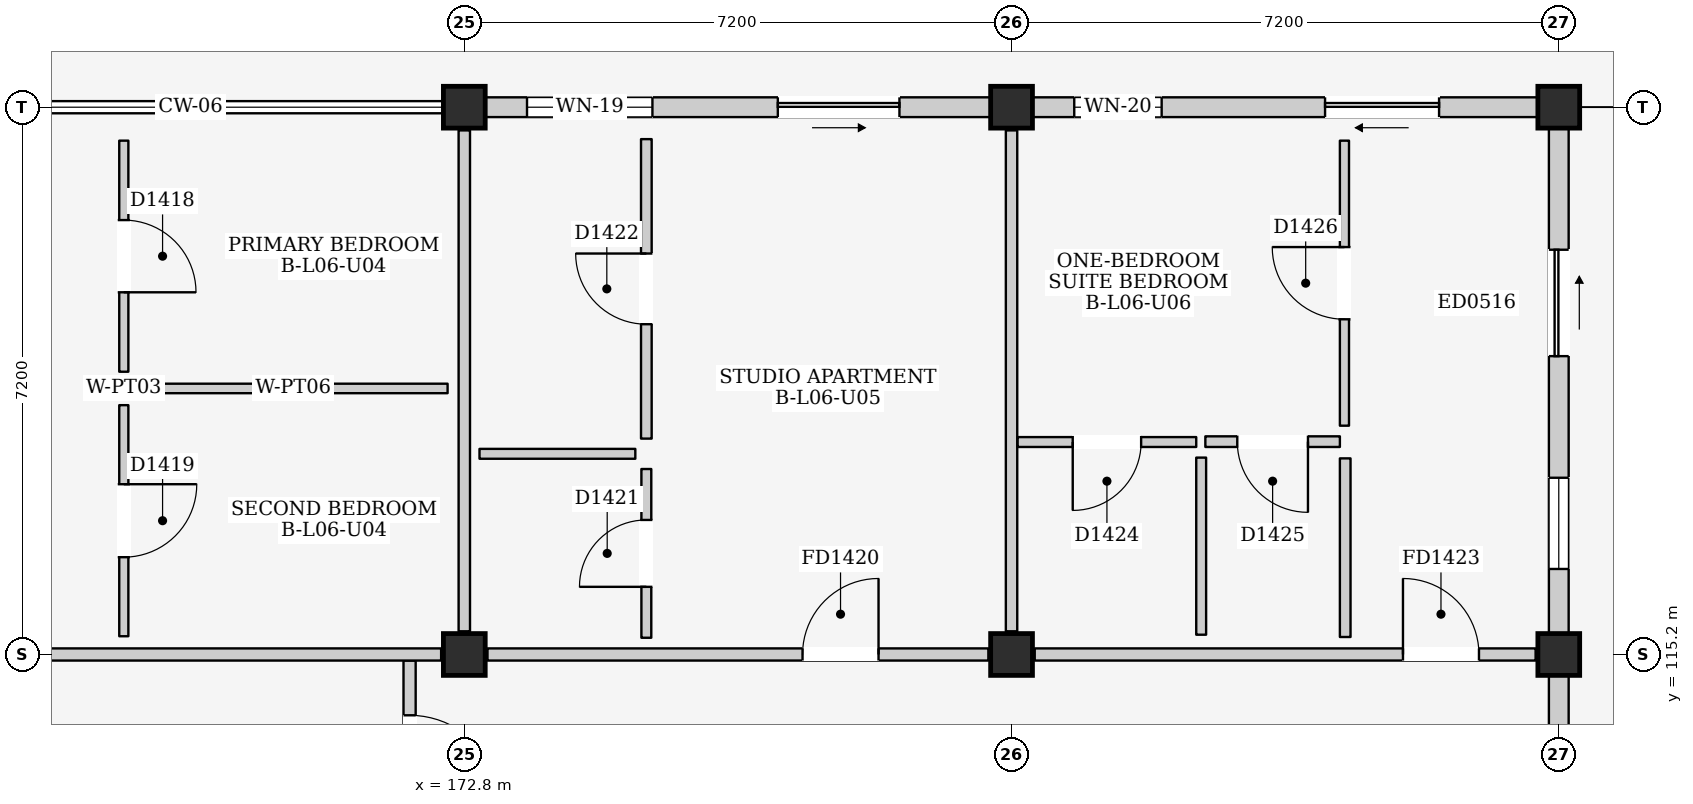
"""IFC4 building model, lengths in metres.
Left out: names, types, materials, properties, quantities, classifications, styles, units other than length and angle.
Written with IfcOpenShell. Run it as: python <this file> out.ifc"""

import sys

from ifc_helpers import new_model, si_unit, direction, frame, frame_2d, origin, origin_2d, place, context, subcontext, project, spatial, rectangle, extrude, element, fill, save


model = new_model("IFC4")
c1 = context("Model", 3, precision=1e-05, world=origin(), true_north=direction((0.0, 1.0)))
c2 = subcontext(c1, "Body", "Model", "MODEL_VIEW")
j1 = project(units=[si_unit("LENGTHUNIT", "METRE"), si_unit("PLANEANGLEUNIT", "RADIAN")], contexts=[c1])
p1 = place(None, origin())
s1 = spatial("IfcSite", under=j1, at=p1, CompositionType="ELEMENT")
p2 = place(p1, origin())
s2 = spatial("IfcBuilding", under=s1, at=p2, CompositionType="ELEMENT")
p3 = place(p2, frame((0.0, 0.0, 21.9)))
s3 = spatial("IfcBuildingStorey", under=s2, at=p3, CompositionType="ELEMENT", Elevation=21.9)
for number, where, z_axis, x_axis in (
    (1, (172.8, 115.2, 0.0), (0.0, 0.0, 1.0), (1.0, 0.0, 0.0)),
    (2, (172.8, 122.4, 0.0), (0.0, 0.0, 1.0), (1.0, 0.0, 0.0)),
    (3, (180.0, 115.2, 0.0), (0.0, 0.0, 1.0), (1.0, 0.0, 0.0)),
    (4, (180.0, 122.4, 0.0), (0.0, 0.0, 1.0), (1.0, 0.0, 0.0)),
    (5, (187.2, 115.2, 0.0), (0.0, 0.0, 1.0), (1.0, 0.0, 0.0)),
    (6, (187.2, 122.4, 0.0), (0.0, 0.0, 1.0), (1.0, 0.0, 0.0)),
):
    element("IfcColumn", number, at=place(p3, frame(where, z_axis=z_axis, x_axis=x_axis)), inside=s3, PredefinedType="COLUMN", context=c2, shape_type="SweptSolid", body=[
        extrude(rectangle(XDim=0.55, YDim=0.55, at=origin_2d()), origin(), (0.0, 0.0, 1.0), 3.2),
    ])
p4 = place(p3, frame((173.075, 122.4, 0.0), z_axis=(0.0, 0.0, 1.0), x_axis=(1.0, 0.0, 0.0)))
e7 = element("IfcWall", 7, at=p4, inside=s3, PredefinedType="ELEMENTEDWALL", context=c2, shape_type="SweptSolid", body=[
    extrude(rectangle(XDim=6.65, YDim=0.26, at=frame_2d((3.325, 0.0))), origin(), (0.0, 0.0, 1.0), 2.515),
])
p5 = place(p4, frame((3.85, 0.0, 0.0)))
e8 = element("IfcOpeningElement", 8, at=p5, cuts=e7, PredefinedType="OPENING", context=c2, shape_type="SweptSolid", body=[
    extrude(rectangle(XDim=1.6, YDim=2.12, at=frame_2d((0.8, 1.06))), frame((0.0, 0.145, 0.0), z_axis=(0.0, -1.0, 0.0), x_axis=(1.0, 0.0, 0.0)), (0.0, 0.0, 1.0), 0.29),
])
p6 = place(p4, frame((0.55, 0.0, 0.9)))
e9 = element("IfcOpeningElement", 9, at=p6, cuts=e7, PredefinedType="OPENING", context=c2, shape_type="SweptSolid", body=[
    extrude(rectangle(XDim=1.65, YDim=1.35, at=frame_2d((0.825, 0.675))), frame((0.0, 0.145, 0.0), z_axis=(0.0, -1.0, 0.0), x_axis=(1.0, 0.0, 0.0)), (0.0, 0.0, 1.0), 0.29),
])
p7 = place(p3, frame((187.2, 108.275, 0.0), z_axis=(0.0, 0.0, 1.0), x_axis=(0.0, 1.0, 0.0)))
e10 = element("IfcWall", 10, at=p7, inside=s3, PredefinedType="ELEMENTEDWALL", context=c2, shape_type="SweptSolid", body=[
    extrude(rectangle(XDim=6.65, YDim=0.26, at=frame_2d((3.325, 0.0))), origin(), (0.0, 0.0, 1.0), 2.515),
])
p8 = place(p7, frame((3.65, 0.0, 0.0)))
e11 = element("IfcOpeningElement", 11, at=p8, cuts=e10, PredefinedType="OPENING", context=c2, shape_type="SweptSolid", body=[
    extrude(rectangle(XDim=1.4, YDim=2.1, at=frame_2d((0.7, 1.05))), frame((0.0, 0.145, 0.0), z_axis=(0.0, -1.0, 0.0), x_axis=(1.0, 0.0, 0.0)), (0.0, 0.0, 1.0), 0.29),
])
p9 = place(p3, frame((180.275, 122.4, 0.0), z_axis=(0.0, 0.0, 1.0), x_axis=(1.0, 0.0, 0.0)))
e12 = element("IfcWall", 12, at=p9, inside=s3, PredefinedType="ELEMENTEDWALL", context=c2, shape_type="SweptSolid", body=[
    extrude(rectangle(XDim=6.65, YDim=0.26, at=frame_2d((3.325, 0.0))), origin(), (0.0, 0.0, 1.0), 2.515),
])
p10 = place(p9, frame((3.85, 0.0, 0.0)))
e13 = element("IfcOpeningElement", 13, at=p10, cuts=e12, PredefinedType="OPENING", context=c2, shape_type="SweptSolid", body=[
    extrude(rectangle(XDim=1.5, YDim=2.12, at=frame_2d((0.75, 1.06))), frame((0.0, 0.145, 0.0), z_axis=(0.0, -1.0, 0.0), x_axis=(1.0, 0.0, 0.0)), (0.0, 0.0, 1.0), 0.29),
])
p11 = place(p9, frame((0.55, 0.0, 0.9)))
e14 = element("IfcOpeningElement", 14, at=p11, cuts=e12, PredefinedType="OPENING", context=c2, shape_type="SweptSolid", body=[
    extrude(rectangle(XDim=1.15, YDim=1.15, at=frame_2d((0.575, 0.575))), frame((0.0, 0.145, 0.0), z_axis=(0.0, -1.0, 0.0), x_axis=(1.0, 0.0, 0.0)), (0.0, 0.0, 1.0), 0.29),
])
p12 = place(p3, frame((187.2, 115.475, 0.0), z_axis=(0.0, 0.0, 1.0), x_axis=(0.0, 1.0, 0.0)))
e15 = element("IfcWall", 15, at=p12, inside=s3, PredefinedType="ELEMENTEDWALL", context=c2, shape_type="SweptSolid", body=[
    extrude(rectangle(XDim=6.65, YDim=0.26, at=frame_2d((3.325, 0.0))), origin(), (0.0, 0.0, 1.0), 2.515),
])
p13 = place(p12, frame((3.65, 0.0, 0.0)))
e16 = element("IfcOpeningElement", 16, at=p13, cuts=e15, PredefinedType="OPENING", context=c2, shape_type="SweptSolid", body=[
    extrude(rectangle(XDim=1.4, YDim=2.1, at=frame_2d((0.7, 1.05))), frame((0.0, 0.145, 0.0), z_axis=(0.0, -1.0, 0.0), x_axis=(1.0, 0.0, 0.0)), (0.0, 0.0, 1.0), 0.29),
])
p14 = place(p12, frame((0.85, 0.0, 0.95)))
e17 = element("IfcOpeningElement", 17, at=p14, cuts=e15, PredefinedType="OPENING", context=c2, shape_type="SweptSolid", body=[
    extrude(rectangle(XDim=1.2, YDim=1.35, at=frame_2d((0.6, 0.675))), frame((0.0, 0.145, 0.0), z_axis=(0.0, -1.0, 0.0), x_axis=(1.0, 0.0, 0.0)), (0.0, 0.0, 1.0), 0.29),
])
p15 = place(p3, frame((172.08, 110.8, 0.0), z_axis=(0.0, 0.0, 1.0), x_axis=(0.0, 1.0, 0.0)))
e18 = element("IfcWall", 18, at=p15, inside=s3, PredefinedType="PARTITIONING", context=c2, shape_type="SweptSolid", body=[
    extrude(rectangle(XDim=4.32, YDim=0.16, at=frame_2d((2.16, 0.0))), origin(), (0.0, 0.0, 1.0), 2.98),
])
p16 = place(p15, frame((2.4, 0.0, 0.0)))
e19 = element("IfcOpeningElement", 19, at=p16, cuts=e18, PredefinedType="OPENING", context=c2, shape_type="SweptSolid", body=[
    extrude(rectangle(XDim=1.2, YDim=2.2, at=frame_2d((0.6, 1.1))), frame((0.0, 0.095, 0.0), z_axis=(0.0, -1.0, 0.0), x_axis=(1.0, 0.0, 0.0)), (0.0, 0.0, 1.0), 0.19),
])
p17 = place(p3, frame((165.905, 115.2, 0.0), z_axis=(0.0, 0.0, 1.0), x_axis=(1.0, 0.0, 0.0)))
e20 = element("IfcWall", 20, at=p17, inside=s3, PredefinedType="PARTITIONING", context=c2, shape_type="SweptSolid", body=[
    extrude(rectangle(XDim=6.59, YDim=0.16, at=frame_2d((3.295, 0.0))), origin(), (0.0, 0.0, 1.0), 2.365),
])
p18 = place(p3, frame((172.8, 115.505, 0.0), z_axis=(0.0, 0.0, 1.0), x_axis=(0.0, 1.0, 0.0)))
e21 = element("IfcWall", 21, at=p18, inside=s3, PredefinedType="PARTITIONING", context=c2, shape_type="SweptSolid", body=[
    extrude(rectangle(XDim=6.59, YDim=0.15, at=frame_2d((3.295, 0.0))), origin(), (0.0, 0.0, 1.0), 2.465),
])
p19 = place(p3, frame((168.32, 118.92, 0.0), z_axis=(0.0, 0.0, 1.0), x_axis=(0.0, 1.0, 0.0)))
e22 = element("IfcWall", 22, at=p19, inside=s3, PredefinedType="PARTITIONING", context=c2, shape_type="SweptSolid", body=[
    extrude(rectangle(XDim=3.04, YDim=0.12, at=frame_2d((1.52, 0.0))), origin(), (0.0, 0.0, 1.0), 2.98),
])
p20 = place(p19, frame((1.045, 0.0, 0.0)))
e23 = element("IfcOpeningElement", 23, at=p20, cuts=e22, PredefinedType="OPENING", context=c2, shape_type="SweptSolid", body=[
    extrude(rectangle(XDim=0.95, YDim=2.15, at=frame_2d((0.475, 1.075))), frame((0.0, 0.075, 0.0), z_axis=(0.0, -1.0, 0.0), x_axis=(1.0, 0.0, 0.0)), (0.0, 0.0, 1.0), 0.15),
])
p21 = place(p3, frame((168.52, 118.7, 0.0), z_axis=(0.0, 0.0, 1.0), x_axis=(1.0, 0.0, 0.0)))
e24 = element("IfcWall", 24, at=p21, inside=s3, PredefinedType="PARTITIONING", context=c2, shape_type="SweptSolid", body=[
    extrude(rectangle(XDim=4.06, YDim=0.125, at=frame_2d((2.03, 0.0))), origin(), (0.0, 0.0, 1.0), 2.98),
])
p22 = place(p3, frame((168.32, 115.44, 0.0), z_axis=(0.0, 0.0, 1.0), x_axis=(0.0, 1.0, 0.0)))
e25 = element("IfcWall", 25, at=p22, inside=s3, PredefinedType="PARTITIONING", context=c2, shape_type="SweptSolid", body=[
    extrude(rectangle(XDim=3.04, YDim=0.12, at=frame_2d((1.52, 0.0))), origin(), (0.0, 0.0, 1.0), 2.98),
])
p23 = place(p22, frame((1.04, 0.0, 0.0)))
e26 = element("IfcOpeningElement", 26, at=p23, cuts=e25, PredefinedType="OPENING", context=c2, shape_type="SweptSolid", body=[
    extrude(rectangle(XDim=0.96, YDim=2.15, at=frame_2d((0.48, 1.075))), frame((0.0, 0.075, 0.0), z_axis=(0.0, -1.0, 0.0), x_axis=(1.0, 0.0, 0.0)), (0.0, 0.0, 1.0), 0.15),
])
p24 = place(p3, frame((173.105, 115.2, 0.0), z_axis=(0.0, 0.0, 1.0), x_axis=(1.0, 0.0, 0.0)))
e27 = element("IfcWall", 27, at=p24, inside=s3, PredefinedType="PARTITIONING", context=c2, shape_type="SweptSolid", body=[
    extrude(rectangle(XDim=6.59, YDim=0.16, at=frame_2d((3.295, 0.0))), origin(), (0.0, 0.0, 1.0), 2.365),
])
p25 = place(p24, frame((4.145, 0.0, 0.0)))
e28 = element("IfcOpeningElement", 28, at=p25, cuts=e27, PredefinedType="OPENING", context=c2, shape_type="SweptSolid", body=[
    extrude(rectangle(XDim=1.0, YDim=2.15, at=frame_2d((0.5, 1.075))), frame((0.0, 0.095, 0.0), z_axis=(0.0, -1.0, 0.0), x_axis=(1.0, 0.0, 0.0)), (0.0, 0.0, 1.0), 0.19),
])
p26 = place(p3, frame((180.0, 115.505, 0.0), z_axis=(0.0, 0.0, 1.0), x_axis=(0.0, 1.0, 0.0)))
e29 = element("IfcWall", 29, at=p26, inside=s3, PredefinedType="PARTITIONING", context=c2, shape_type="SweptSolid", body=[
    extrude(rectangle(XDim=6.59, YDim=0.15, at=frame_2d((3.295, 0.0))), origin(), (0.0, 0.0, 1.0), 2.465),
])
p27 = place(p3, frame((173.0, 117.84, 0.0), z_axis=(0.0, 0.0, 1.0), x_axis=(1.0, 0.0, 0.0)))
e30 = element("IfcWall", 30, at=p27, inside=s3, PredefinedType="PARTITIONING", context=c2, shape_type="SweptSolid", body=[
    extrude(rectangle(XDim=2.05, YDim=0.13, at=frame_2d((1.025, 0.0))), origin(), (0.0, 0.0, 1.0), 2.98),
])
p28 = place(p3, frame((175.195, 115.42, 0.0), z_axis=(0.0, 0.0, 1.0), x_axis=(0.0, 1.0, 0.0)))
e31 = element("IfcWall", 31, at=p28, inside=s3, PredefinedType="PARTITIONING", context=c2, shape_type="SweptSolid", body=[
    extrude(rectangle(XDim=2.22, YDim=0.13, at=frame_2d((1.11, 0.0))), origin(), (0.0, 0.0, 1.0), 2.98),
])
p29 = place(p28, frame((0.67, 0.0, 0.0)))
e32 = element("IfcOpeningElement", 32, at=p29, cuts=e31, PredefinedType="OPENING", context=c2, shape_type="SweptSolid", body=[
    extrude(rectangle(XDim=0.88, YDim=2.1, at=frame_2d((0.44, 1.05))), frame((0.0, 0.08, 0.0), z_axis=(0.0, -1.0, 0.0), x_axis=(1.0, 0.0, 0.0)), (0.0, 0.0, 1.0), 0.16),
])
p30 = place(p3, frame((175.195, 118.04, 0.0), z_axis=(0.0, 0.0, 1.0), x_axis=(0.0, 1.0, 0.0)))
e33 = element("IfcWall", 33, at=p30, inside=s3, PredefinedType="PARTITIONING", context=c2, shape_type="SweptSolid", body=[
    extrude(rectangle(XDim=3.94, YDim=0.14, at=frame_2d((1.97, 0.0))), origin(), (0.0, 0.0, 1.0), 2.98),
])
p31 = place(p30, frame((1.505, 0.0, 0.0)))
e34 = element("IfcOpeningElement", 34, at=p31, cuts=e33, PredefinedType="OPENING", context=c2, shape_type="SweptSolid", body=[
    extrude(rectangle(XDim=0.93, YDim=2.14, at=frame_2d((0.465, 1.07))), frame((0.0, 0.085, 0.0), z_axis=(0.0, -1.0, 0.0), x_axis=(1.0, 0.0, 0.0)), (0.0, 0.0, 1.0), 0.17),
])
p32 = place(p3, frame((180.305, 115.2, 0.0), z_axis=(0.0, 0.0, 1.0), x_axis=(1.0, 0.0, 0.0)))
e35 = element("IfcWall", 35, at=p32, inside=s3, PredefinedType="PARTITIONING", context=c2, shape_type="SweptSolid", body=[
    extrude(rectangle(XDim=6.59, YDim=0.16, at=frame_2d((3.295, 0.0))), origin(), (0.0, 0.0, 1.0), 2.365),
])
p33 = place(p32, frame((4.845, 0.0, 0.0)))
e36 = element("IfcOpeningElement", 36, at=p33, cuts=e35, PredefinedType="OPENING", context=c2, shape_type="SweptSolid", body=[
    extrude(rectangle(XDim=1.0, YDim=2.15, at=frame_2d((0.5, 1.075))), frame((0.0, 0.095, 0.0), z_axis=(0.0, -1.0, 0.0), x_axis=(1.0, 0.0, 0.0)), (0.0, 0.0, 1.0), 0.19),
])
p34 = place(p3, frame((180.08, 117.995, 0.0), z_axis=(0.0, 0.0, 1.0), x_axis=(1.0, 0.0, 0.0)))
e37 = element("IfcWall", 37, at=p34, inside=s3, PredefinedType="PARTITIONING", context=c2, shape_type="SweptSolid", body=[
    extrude(rectangle(XDim=2.35, YDim=0.13, at=frame_2d((1.175, 0.0))), origin(), (0.0, 0.0, 1.0), 2.98),
])
p35 = place(p34, frame((0.725, 0.0, 0.0)))
e38 = element("IfcOpeningElement", 38, at=p35, cuts=e37, PredefinedType="OPENING", context=c2, shape_type="SweptSolid", body=[
    extrude(rectangle(XDim=0.9, YDim=2.1, at=frame_2d((0.45, 1.05))), frame((0.0, 0.08, 0.0), z_axis=(0.0, -1.0, 0.0), x_axis=(1.0, 0.0, 0.0)), (0.0, 0.0, 1.0), 0.16),
])
p36 = place(p3, frame((182.495, 115.46, 0.0), z_axis=(0.0, 0.0, 1.0), x_axis=(0.0, 1.0, 0.0)))
e39 = element("IfcWall", 39, at=p36, inside=s3, PredefinedType="PARTITIONING", context=c2, shape_type="SweptSolid", body=[
    extrude(rectangle(XDim=2.33, YDim=0.13, at=frame_2d((1.165, 0.0))), origin(), (0.0, 0.0, 1.0), 2.98),
])
p37 = place(p3, frame((182.55, 118.0, 0.0), z_axis=(0.0, 0.0, 1.0), x_axis=(1.0, 0.0, 0.0)))
e40 = element("IfcWall", 40, at=p37, inside=s3, PredefinedType="PARTITIONING", context=c2, shape_type="SweptSolid", body=[
    extrude(rectangle(XDim=1.77, YDim=0.14, at=frame_2d((0.885, 0.0))), origin(), (0.0, 0.0, 1.0), 2.98),
])
p38 = place(p37, frame((0.42, 0.0, 0.0)))
e41 = element("IfcOpeningElement", 41, at=p38, cuts=e40, PredefinedType="OPENING", context=c2, shape_type="SweptSolid", body=[
    extrude(rectangle(XDim=0.93, YDim=2.14, at=frame_2d((0.465, 1.07))), frame((0.0, 0.085, 0.0), z_axis=(0.0, -1.0, 0.0), x_axis=(1.0, 0.0, 0.0)), (0.0, 0.0, 1.0), 0.17),
])
p39 = place(p3, frame((184.39, 115.43, 0.0), z_axis=(0.0, 0.0, 1.0), x_axis=(0.0, 1.0, 0.0)))
e42 = element("IfcWall", 42, at=p39, inside=s3, PredefinedType="PARTITIONING", context=c2, shape_type="SweptSolid", body=[
    extrude(rectangle(XDim=2.35, YDim=0.14, at=frame_2d((1.175, 0.0))), origin(), (0.0, 0.0, 1.0), 2.98),
])
p40 = place(p3, frame((184.38, 118.21, 0.0), z_axis=(0.0, 0.0, 1.0), x_axis=(0.0, 1.0, 0.0)))
e43 = element("IfcWall", 43, at=p40, inside=s3, PredefinedType="PARTITIONING", context=c2, shape_type="SweptSolid", body=[
    extrude(rectangle(XDim=3.75, YDim=0.12, at=frame_2d((1.875, 0.0))), origin(), (0.0, 0.0, 1.0), 2.98),
])
p41 = place(p40, frame((1.4, 0.0, 0.0)))
e44 = element("IfcOpeningElement", 44, at=p41, cuts=e43, PredefinedType="OPENING", context=c2, shape_type="SweptSolid", body=[
    extrude(rectangle(XDim=0.95, YDim=2.15, at=frame_2d((0.475, 1.075))), frame((0.0, 0.075, 0.0), z_axis=(0.0, -1.0, 0.0), x_axis=(1.0, 0.0, 0.0)), (0.0, 0.0, 1.0), 0.15),
])
p42 = place(p5, frame((1.6, 0.0, 0.0), z_axis=(0.0, 0.0, 1.0), x_axis=(-1.0, 0.0, 0.0)))
e45 = element("IfcDoor", 45, at=p42, inside=s3, OperationType="SLIDING_TO_RIGHT", PredefinedType="DOOR", context=c2, shape_type="SweptSolid", body=[
    extrude(rectangle(XDim=1.6, YDim=2.12, at=frame_2d((0.8, 1.06))), frame((0.0, 0.025, 0.0), z_axis=(0.0, -1.0, 0.0), x_axis=(1.0, 0.0, 0.0)), (0.0, 0.0, 1.0), 0.05),
])
fill(e8, e45)
p43 = place(p6, origin())
e46 = element("IfcWindow", 46, at=p43, inside=s3, PartitioningType="DOUBLE_PANEL_VERTICAL", PredefinedType="WINDOW", context=c2, shape_type="SweptSolid", body=[
    extrude(rectangle(XDim=1.65, YDim=1.35, at=frame_2d((0.825, 0.675))), frame((0.0, 0.03, 0.0), z_axis=(0.0, -1.0, 0.0), x_axis=(1.0, 0.0, 0.0)), (0.0, 0.0, 1.0), 0.06),
])
fill(e9, e46)
p44 = place(p10, frame((1.5, 0.0, 0.0), z_axis=(0.0, 0.0, 1.0), x_axis=(-1.0, 0.0, 0.0)))
e47 = element("IfcDoor", 47, at=p44, inside=s3, OperationType="SLIDING_TO_LEFT", PredefinedType="DOOR", context=c2, shape_type="SweptSolid", body=[
    extrude(rectangle(XDim=1.5, YDim=2.12, at=frame_2d((0.75, 1.06))), frame((0.0, 0.025, 0.0), z_axis=(0.0, -1.0, 0.0), x_axis=(1.0, 0.0, 0.0)), (0.0, 0.0, 1.0), 0.05),
])
fill(e13, e47)
p45 = place(p11, origin())
e48 = element("IfcWindow", 48, at=p45, inside=s3, PartitioningType="SINGLE_PANEL", PredefinedType="WINDOW", context=c2, shape_type="SweptSolid", body=[
    extrude(rectangle(XDim=1.15, YDim=1.15, at=frame_2d((0.575, 0.575))), frame((0.0, 0.03, 0.0), z_axis=(0.0, -1.0, 0.0), x_axis=(1.0, 0.0, 0.0)), (0.0, 0.0, 1.0), 0.06),
])
fill(e14, e48)
p46 = place(p13, frame((1.4, 0.0, 0.0), z_axis=(0.0, 0.0, 1.0), x_axis=(-1.0, 0.0, 0.0)))
e49 = element("IfcDoor", 49, at=p46, inside=s3, OperationType="SLIDING_TO_RIGHT", PredefinedType="DOOR", context=c2, shape_type="SweptSolid", body=[
    extrude(rectangle(XDim=1.4, YDim=2.1, at=frame_2d((0.7, 1.05))), frame((0.0, 0.025, 0.0), z_axis=(0.0, -1.0, 0.0), x_axis=(1.0, 0.0, 0.0)), (0.0, 0.0, 1.0), 0.05),
])
fill(e16, e49)
p47 = place(p14, origin())
e50 = element("IfcWindow", 50, at=p47, inside=s3, PartitioningType="SINGLE_PANEL", PredefinedType="WINDOW", context=c2, shape_type="SweptSolid", body=[
    extrude(rectangle(XDim=1.2, YDim=1.35, at=frame_2d((0.6, 0.675))), frame((0.0, 0.03, 0.0), z_axis=(0.0, -1.0, 0.0), x_axis=(1.0, 0.0, 0.0)), (0.0, 0.0, 1.0), 0.06),
])
fill(e17, e50)
p48 = place(p16, frame((1.2, 0.0, 0.0), z_axis=(0.0, 0.0, 1.0), x_axis=(-1.0, 0.0, 0.0)))
e51 = element("IfcDoor", 51, at=p48, inside=s3, OperationType="SINGLE_SWING_RIGHT", PredefinedType="DOOR", context=c2, shape_type="SweptSolid", body=[
    extrude(rectangle(XDim=1.2, YDim=2.2, at=frame_2d((0.6, 1.1))), frame((0.0, 0.025, 0.0), z_axis=(0.0, -1.0, 0.0), x_axis=(1.0, 0.0, 0.0)), (0.0, 0.0, 1.0), 0.05),
])
fill(e19, e51)
p49 = place(p20, frame((0.95, 0.0, 0.0), z_axis=(0.0, 0.0, 1.0), x_axis=(-1.0, 0.0, 0.0)))
e52 = element("IfcDoor", 52, at=p49, inside=s3, OperationType="SINGLE_SWING_RIGHT", PredefinedType="DOOR", context=c2, shape_type="SweptSolid", body=[
    extrude(rectangle(XDim=0.95, YDim=2.15, at=frame_2d((0.475, 1.075))), frame((0.0, 0.025, 0.0), z_axis=(0.0, -1.0, 0.0), x_axis=(1.0, 0.0, 0.0)), (0.0, 0.0, 1.0), 0.05),
])
fill(e23, e52)
p50 = place(p23, frame((0.96, 0.0, 0.0), z_axis=(0.0, 0.0, 1.0), x_axis=(-1.0, 0.0, 0.0)))
e53 = element("IfcDoor", 53, at=p50, inside=s3, OperationType="SINGLE_SWING_LEFT", PredefinedType="DOOR", context=c2, shape_type="SweptSolid", body=[
    extrude(rectangle(XDim=0.96, YDim=2.15, at=frame_2d((0.48, 1.075))), frame((0.0, 0.025, 0.0), z_axis=(0.0, -1.0, 0.0), x_axis=(1.0, 0.0, 0.0)), (0.0, 0.0, 1.0), 0.05),
])
fill(e26, e53)
p51 = place(p25, origin())
e54 = element("IfcDoor", 54, at=p51, inside=s3, OperationType="SINGLE_SWING_RIGHT", PredefinedType="DOOR", context=c2, shape_type="SweptSolid", body=[
    extrude(rectangle(XDim=1.0, YDim=2.15, at=frame_2d((0.5, 1.075))), frame((0.0, 0.025, 0.0), z_axis=(0.0, -1.0, 0.0), x_axis=(1.0, 0.0, 0.0)), (0.0, 0.0, 1.0), 0.05),
])
fill(e28, e54)
p52 = place(p29, origin())
e55 = element("IfcDoor", 55, at=p52, inside=s3, OperationType="SINGLE_SWING_LEFT", PredefinedType="DOOR", context=c2, shape_type="SweptSolid", body=[
    extrude(rectangle(XDim=0.88, YDim=2.1, at=frame_2d((0.44, 1.05))), frame((0.0, 0.025, 0.0), z_axis=(0.0, -1.0, 0.0), x_axis=(1.0, 0.0, 0.0)), (0.0, 0.0, 1.0), 0.05),
])
fill(e32, e55)
p53 = place(p31, origin())
e56 = element("IfcDoor", 56, at=p53, inside=s3, OperationType="SINGLE_SWING_RIGHT", PredefinedType="DOOR", context=c2, shape_type="SweptSolid", body=[
    extrude(rectangle(XDim=0.93, YDim=2.14, at=frame_2d((0.465, 1.07))), frame((0.0, 0.025, 0.0), z_axis=(0.0, -1.0, 0.0), x_axis=(1.0, 0.0, 0.0)), (0.0, 0.0, 1.0), 0.05),
])
fill(e34, e56)
p54 = place(p33, origin())
e57 = element("IfcDoor", 57, at=p54, inside=s3, OperationType="SINGLE_SWING_LEFT", PredefinedType="DOOR", context=c2, shape_type="SweptSolid", body=[
    extrude(rectangle(XDim=1.0, YDim=2.15, at=frame_2d((0.5, 1.075))), frame((0.0, 0.025, 0.0), z_axis=(0.0, -1.0, 0.0), x_axis=(1.0, 0.0, 0.0)), (0.0, 0.0, 1.0), 0.05),
])
fill(e36, e57)
p55 = place(p35, frame((0.9, 0.0, 0.0), z_axis=(0.0, 0.0, 1.0), x_axis=(-1.0, 0.0, 0.0)))
e58 = element("IfcDoor", 58, at=p55, inside=s3, OperationType="SINGLE_SWING_RIGHT", PredefinedType="DOOR", context=c2, shape_type="SweptSolid", body=[
    extrude(rectangle(XDim=0.9, YDim=2.1, at=frame_2d((0.45, 1.05))), frame((0.0, 0.025, 0.0), z_axis=(0.0, -1.0, 0.0), x_axis=(1.0, 0.0, 0.0)), (0.0, 0.0, 1.0), 0.05),
])
fill(e38, e58)
p56 = place(p38, frame((0.93, 0.0, 0.0), z_axis=(0.0, 0.0, 1.0), x_axis=(-1.0, 0.0, 0.0)))
e59 = element("IfcDoor", 59, at=p56, inside=s3, OperationType="SINGLE_SWING_LEFT", PredefinedType="DOOR", context=c2, shape_type="SweptSolid", body=[
    extrude(rectangle(XDim=0.93, YDim=2.14, at=frame_2d((0.465, 1.07))), frame((0.0, 0.025, 0.0), z_axis=(0.0, -1.0, 0.0), x_axis=(1.0, 0.0, 0.0)), (0.0, 0.0, 1.0), 0.05),
])
fill(e41, e59)
p57 = place(p41, origin())
e60 = element("IfcDoor", 60, at=p57, inside=s3, OperationType="SINGLE_SWING_RIGHT", PredefinedType="DOOR", context=c2, shape_type="SweptSolid", body=[
    extrude(rectangle(XDim=0.95, YDim=2.15, at=frame_2d((0.475, 1.075))), frame((0.0, 0.025, 0.0), z_axis=(0.0, -1.0, 0.0), x_axis=(1.0, 0.0, 0.0)), (0.0, 0.0, 1.0), 0.05),
])
fill(e44, e60)
save(model, sys.argv[1])
